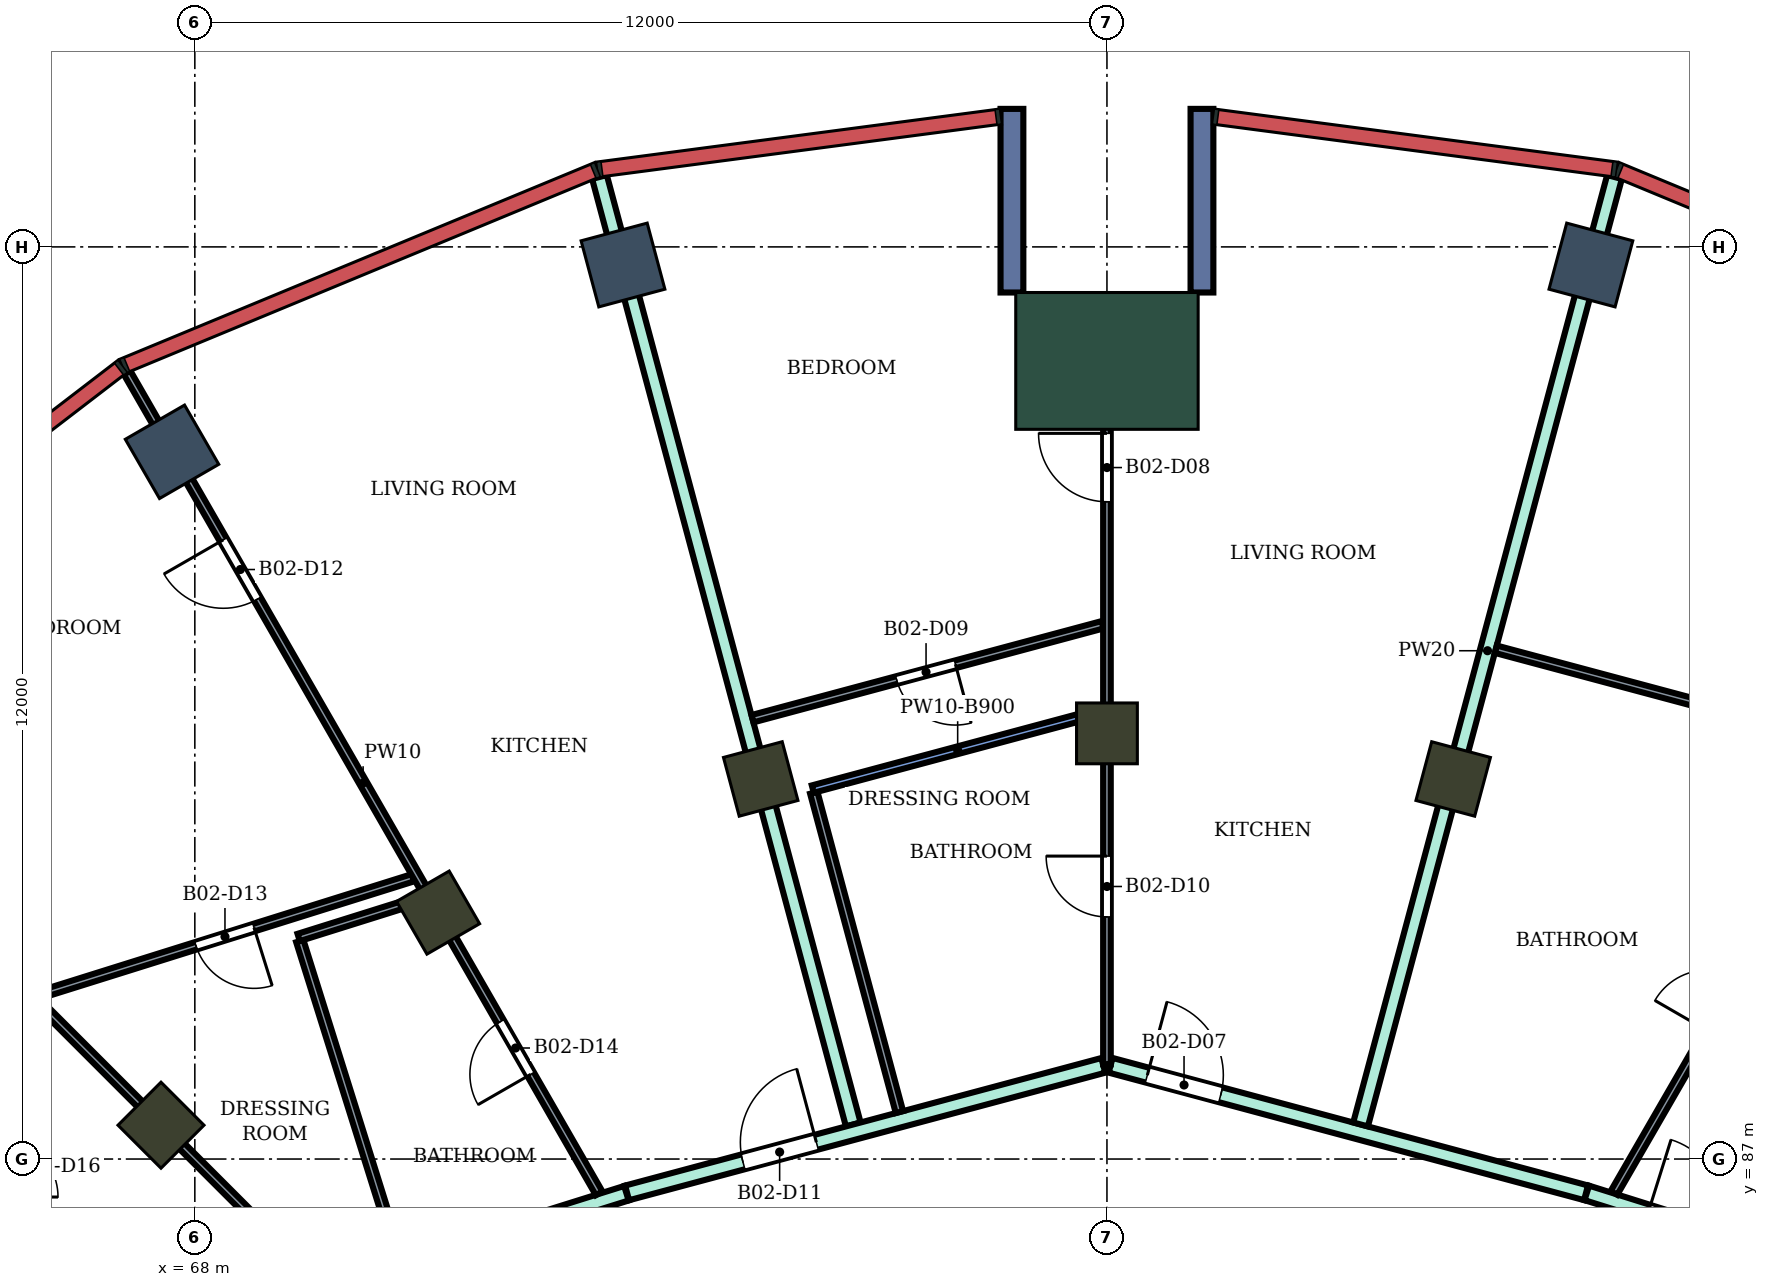
"""IFC4 building model, lengths in metres.
Left out: names, types, materials, properties, quantities, classifications, styles, units other than length and angle.
Written with IfcOpenShell. Run it as: python <this file> out.ifc"""

import sys

from ifc_helpers import new_model, si_unit, direction, frame, frame_2d, origin, origin_2d, place, context, subcontext, project, spatial, rectangle, extrude, element, fill, save


model = new_model("IFC4")
c1 = context("Model", 3, precision=1e-05, world=origin(), true_north=direction((0.0, 1.0)))
c2 = subcontext(c1, "Body", "Model", "MODEL_VIEW")
j1 = project(units=[si_unit("LENGTHUNIT", "METRE"), si_unit("PLANEANGLEUNIT", "RADIAN")], contexts=[c1])
p1 = place(None, origin())
s1 = spatial("IfcSite", under=j1, at=p1, CompositionType="ELEMENT")
p2 = place(p1, origin())
s2 = spatial("IfcBuilding", under=s1, at=p2, CompositionType="ELEMENT")
p3 = place(p2, frame((0.0, 0.0, 225.1)))
s3 = spatial("IfcBuildingStorey", under=s2, at=p3, CompositionType="ELEMENT", Elevation=225.1)
for number, where, z_axis, x_axis in (
    (1, (86.367, 98.762, 0.0), (0.0, 0.0, 1.0), (0.259, 0.966, 0.0)),
    (2, (73.633, 98.762, 0.0), (0.0, 0.0, 1.0), (-0.259, 0.966, 0.0)),
    (3, (67.7, 96.304, 0.0), (0.0, 0.0, 1.0), (-0.5, 0.866, 0.0)),
):
    element("IfcColumn", number, at=place(p3, frame(where, z_axis=z_axis, x_axis=x_axis)), inside=s3, PredefinedType="COLUMN", context=c2, shape_type="SweptSolid", body=[
        extrude(rectangle(XDim=0.9, YDim=0.9, at=origin_2d()), origin(), (0.0, 0.0, 1.0), 4.2),
    ])
for number, where, z_axis, x_axis in (
    (4, (84.555, 92.0, 0.0), (0.0, 0.0, 1.0), (0.259, 0.966, 0.0)),
    (5, (80.0, 92.6, 0.0), (0.0, 0.0, 1.0), (0.0, 1.0, 0.0)),
    (6, (75.445, 92.0, 0.0), (0.0, 0.0, 1.0), (-0.259, 0.966, 0.0)),
    (7, (71.2, 90.242, 0.0), (0.0, 0.0, 1.0), (-0.5, 0.866, 0.0)),
    (8, (67.555, 87.445, 0.0), (0.0, 0.0, 1.0), (-0.707, 0.707, 0.0)),
):
    element("IfcColumn", number, at=place(p3, frame(where, z_axis=z_axis, x_axis=x_axis)), inside=s3, PredefinedType="COLUMN", context=c2, shape_type="SweptSolid", body=[
        extrude(rectangle(XDim=0.8, YDim=0.8, at=origin_2d()), origin(), (0.0, 0.0, 1.0), 4.2),
    ])
p4 = place(p3, frame((80.0, 97.5, 0.0), z_axis=(0.0, 0.0, 1.0), x_axis=(0.0, 1.0, 0.0)))
e9 = element("IfcColumn", 9, at=p4, inside=s3, PredefinedType="COLUMN", context=c2, shape_type="SweptSolid", body=[
    extrude(rectangle(XDim=1.8, YDim=2.4, at=origin_2d()), origin(), (0.0, 0.0, 1.0), 4.2),
])
for number, where, z_axis, x_axis in (
    (10, (81.25, 98.4, 0.0), (0.0, 0.0, 1.0), (0.0, 1.0, 0.0)),
    (11, (78.75, 98.4, 0.0), (0.0, 0.0, 1.0), (0.0, 1.0, 0.0)),
):
    element("IfcWall", number, at=place(p3, frame(where, z_axis=z_axis, x_axis=x_axis)), inside=s3, PredefinedType="NOTDEFINED", context=c2, shape_type="SweptSolid", body=[
        extrude(rectangle(XDim=2.416, YDim=0.3, at=frame_2d((1.208, 0.0))), origin(), (0.0, 0.0, 1.0), 4.2),
    ])
p5 = place(p3, frame((68.2, 84.834, 0.0), z_axis=(0.0, 0.0, 1.0), x_axis=(0.954260265251, 0.298977166624, 0.0)))
e12 = element("IfcWall", 12, at=p5, inside=s3, PredefinedType="PARTITIONING", context=c2, shape_type="SweptSolid", body=[
    extrude(rectangle(XDim=5.741, YDim=0.2, at=frame_2d((2.87, 0.0))), origin(), (0.0, 0.0, 1.0), 3.75),
])
p6 = place(p3, frame((73.323, 99.919, 0.0), z_axis=(0.0, 0.0, 1.0), x_axis=(0.258768239436, -0.965939438194, 0.0)))
e13 = element("IfcWall", 13, at=p6, inside=s3, PredefinedType="PARTITIONING", context=c2, shape_type="SweptSolid", body=[
    extrude(rectangle(XDim=12.904, YDim=0.2, at=frame_2d((6.452, 0.0))), origin(), (0.0, 0.0, 1.0), 3.75),
])
p7 = place(p3, frame((73.687, 86.554, 0.0), z_axis=(0.0, 0.0, 1.0), x_axis=(0.96595258731, 0.258719150952, 0.0)))
e14 = element("IfcWall", 14, at=p7, inside=s3, PredefinedType="PARTITIONING", context=c2, shape_type="SweptSolid", body=[
    extrude(rectangle(XDim=6.486, YDim=0.2, at=frame_2d((3.243, 0.0))), origin(), (0.0, 0.0, 1.0), 3.75),
])
p8 = place(p7, frame((1.578, 0.0, 0.0)))
e15 = element("IfcOpeningElement", 15, at=p8, cuts=e14, PredefinedType="OPENING", context=c2, shape_type="SweptSolid", body=[
    extrude(rectangle(XDim=1.0, YDim=2.1, at=frame_2d((0.5, 1.05))), frame((0.0, 0.11, 0.0), z_axis=(0.0, -1.0, 0.0), x_axis=(1.0, 0.0, 0.0)), (0.0, 0.0, 1.0), 0.22),
])
p9 = place(p3, frame((80.048, 88.233, 0.0), z_axis=(0.0, 0.0, 1.0), x_axis=(0.965865387308, -0.259044501198, 0.0)))
e16 = element("IfcWall", 16, at=p9, inside=s3, PredefinedType="PARTITIONING", context=c2, shape_type="SweptSolid", body=[
    extrude(rectangle(XDim=6.476, YDim=0.2, at=frame_2d((3.238, 0.0))), origin(), (0.0, 0.0, 1.0), 3.75),
])
p10 = place(p9, frame((0.5, 0.0, 0.0)))
e17 = element("IfcOpeningElement", 17, at=p10, cuts=e16, PredefinedType="OPENING", context=c2, shape_type="SweptSolid", body=[
    extrude(rectangle(XDim=1.0, YDim=2.1, at=frame_2d((0.5, 1.05))), frame((0.0, 0.11, 0.0), z_axis=(0.0, -1.0, 0.0), x_axis=(1.0, 0.0, 0.0)), (0.0, 0.0, 1.0), 0.22),
])
p11 = place(p3, frame((83.337, 87.455, 0.0), z_axis=(0.0, 0.0, 1.0), x_axis=(0.258878883978, 0.965909790524, 0.0)))
e18 = element("IfcWall", 18, at=p11, inside=s3, PredefinedType="PARTITIONING", context=c2, shape_type="SweptSolid", body=[
    extrude(rectangle(XDim=12.904, YDim=0.2, at=frame_2d((6.452, 0.0))), origin(), (0.0, 0.0, 1.0), 3.75),
])
p12 = place(p3, frame((86.313, 86.554, 0.0), z_axis=(0.0, 0.0, 1.0), x_axis=(0.954081217458, -0.299548043717, 0.0)))
e19 = element("IfcWall", 19, at=p12, inside=s3, PredefinedType="PARTITIONING", context=c2, shape_type="SweptSolid", body=[
    extrude(rectangle(XDim=5.721, YDim=0.2, at=frame_2d((2.86, 0.0))), origin(), (0.0, 0.0, 1.0), 3.75),
])
p13 = place(p12, frame((0.848, 0.0, 0.0)))
e20 = element("IfcOpeningElement", 20, at=p13, cuts=e19, PredefinedType="OPENING", context=c2, shape_type="SweptSolid", body=[
    extrude(rectangle(XDim=1.0, YDim=2.1, at=frame_2d((0.5, 1.05))), frame((0.0, 0.11, 0.0), z_axis=(0.0, -1.0, 0.0), x_axis=(1.0, 0.0, 0.0)), (0.0, 0.0, 1.0), 0.22),
])
p14 = place(p3, frame((63.596, 91.406, 0.0), z_axis=(0.0, 0.0, 1.0), x_axis=(0.70700623685, -0.707207311228, 0.0)))
e21 = element("IfcWall", 21, at=p14, inside=s3, PredefinedType="PARTITIONING", context=c2, shape_type="SweptSolid", body=[
    extrude(rectangle(XDim=8.499, YDim=0.1, at=frame_2d((4.25, 0.0))), origin(), (0.0, 0.0, 1.0), 3.75),
])
p15 = place(p14, frame((1.632, 0.0, 0.0)))
e22 = element("IfcOpeningElement", 22, at=p15, cuts=e21, PredefinedType="OPENING", context=c2, shape_type="SweptSolid", body=[
    extrude(rectangle(XDim=0.9, YDim=2.1, at=frame_2d((0.45, 1.05))), frame((0.0, 0.06, 0.0), z_axis=(0.0, -1.0, 0.0), x_axis=(1.0, 0.0, 0.0)), (0.0, 0.0, 1.0), 0.12),
])
p16 = place(p3, frame((65.944, 89.157, 0.0), z_axis=(0.0, 0.0, 1.0), x_axis=(0.954235485309, 0.299056246512, 0.0)))
e23 = element("IfcWall", 23, at=p16, inside=s3, PredefinedType="PARTITIONING", context=c2, shape_type="SweptSolid", body=[
    extrude(rectangle(XDim=5.159, YDim=0.1, at=frame_2d((2.58, 0.0))), origin(), (0.0, 0.0, 1.0), 3.75),
])
p17 = place(p16, frame((2.17, 0.0, 0.0)))
e24 = element("IfcOpeningElement", 24, at=p17, cuts=e23, PredefinedType="OPENING", context=c2, shape_type="SweptSolid", body=[
    extrude(rectangle(XDim=0.8, YDim=2.1, at=frame_2d((0.4, 1.05))), frame((0.0, 0.06, 0.0), z_axis=(0.0, -1.0, 0.0), x_axis=(1.0, 0.0, 0.0)), (0.0, 0.0, 1.0), 0.12),
])
p18 = place(p3, frame((67.109, 97.346, 0.0), z_axis=(0.0, 0.0, 1.0), x_axis=(0.498583439824, -0.866841711925, 0.0)))
e25 = element("IfcWall", 25, at=p18, inside=s3, PredefinedType="PARTITIONING", context=c2, shape_type="SweptSolid", body=[
    extrude(rectangle(XDim=12.456, YDim=0.1, at=frame_2d((6.228, 0.0))), origin(), (0.0, 0.0, 1.0), 3.75),
])
p19 = place(p18, frame((2.538, 0.0, 0.0)))
e26 = element("IfcOpeningElement", 26, at=p19, cuts=e25, PredefinedType="OPENING", context=c2, shape_type="SweptSolid", body=[
    extrude(rectangle(XDim=0.9, YDim=2.1, at=frame_2d((0.45, 1.05))), frame((0.0, 0.06, 0.0), z_axis=(0.0, -1.0, 0.0), x_axis=(1.0, 0.0, 0.0)), (0.0, 0.0, 1.0), 0.12),
])
p20 = place(p18, frame((9.85, 0.0, 0.0)))
e27 = element("IfcOpeningElement", 27, at=p20, cuts=e25, PredefinedType="OPENING", context=c2, shape_type="SweptSolid", body=[
    extrude(rectangle(XDim=0.8, YDim=2.1, at=frame_2d((0.4, 1.05))), frame((0.0, 0.06, 0.0), z_axis=(0.0, -1.0, 0.0), x_axis=(1.0, 0.0, 0.0)), (0.0, 0.0, 1.0), 0.12),
])
p21 = place(p3, frame((69.381, 89.867, 0.0), z_axis=(0.0, 0.0, 1.0), x_axis=(0.29908659099, -0.954225974856, 0.0)))
e28 = element("IfcWall", 28, at=p21, inside=s3, PredefinedType="PARTITIONING", context=c2, shape_type="SweptSolid", body=[
    extrude(rectangle(XDim=4.35, YDim=0.1, at=frame_2d((2.175, 0.0))), origin(), (0.0, 0.0, 1.0), 3.75),
])
p22 = place(p3, frame((69.366, 89.915, 0.0), z_axis=(0.0, 0.0, 1.0), x_axis=(0.954163830168, 0.299284789457, 0.0)))
e29 = element("IfcWall", 29, at=p22, inside=s3, PredefinedType="PARTITIONING", context=c2, shape_type="SweptSolid", body=[
    extrude(rectangle(XDim=1.734, YDim=0.1, at=frame_2d((0.867, 0.0))), origin(), (0.0, 0.0, 1.0), 3.75),
])
p23 = place(p3, frame((75.337, 92.793, 0.0), z_axis=(0.0, 0.0, 1.0), x_axis=(0.965840336715, 0.259137886026, 0.0)))
e30 = element("IfcWall", 30, at=p23, inside=s3, PredefinedType="PARTITIONING", context=c2, shape_type="SweptSolid", body=[
    extrude(rectangle(XDim=4.768, YDim=0.1, at=frame_2d((2.384, 0.0))), origin(), (0.0, 0.0, 1.0), 3.75),
])
p24 = place(p23, frame((1.964, 0.0, 0.0)))
e31 = element("IfcOpeningElement", 31, at=p24, cuts=e30, PredefinedType="OPENING", context=c2, shape_type="SweptSolid", body=[
    extrude(rectangle(XDim=0.8, YDim=2.1, at=frame_2d((0.4, 1.05))), frame((0.0, 0.06, 0.0), z_axis=(0.0, -1.0, 0.0), x_axis=(1.0, 0.0, 0.0)), (0.0, 0.0, 1.0), 0.12),
])
p25 = place(p3, frame((76.143, 91.819, 0.0), z_axis=(0.0, 0.0, 1.0), x_axis=(0.259115794116, -0.965846263771, 0.0)))
e32 = element("IfcWall", 32, at=p25, inside=s3, PredefinedType="PARTITIONING", context=c2, shape_type="SweptSolid", body=[
    extrude(rectangle(XDim=4.349, YDim=0.1, at=frame_2d((2.175, 0.0))), origin(), (0.0, 0.0, 1.0), 3.75),
])
p26 = place(p3, frame((76.13, 91.867, 0.0), z_axis=(0.0, 0.0, 1.0), x_axis=(0.965860204905, 0.259063823373, 0.0)))
e33 = element("IfcWall", 33, at=p26, inside=s3, PredefinedType="PARTITIONING", context=c2, shape_type="SweptSolid", body=[
    extrude(rectangle(XDim=3.947, YDim=0.1, at=frame_2d((1.973, 0.0))), origin(), (0.0, 0.0, 1.0), 3.3),
])
p27 = place(p3, frame((80.0, 88.246, 0.0), z_axis=(0.0, 0.0, 1.0), x_axis=(0.0, 1.0, 0.0)))
e34 = element("IfcWall", 34, at=p27, inside=s3, PredefinedType="PARTITIONING", context=c2, shape_type="SweptSolid", body=[
    extrude(rectangle(XDim=9.954, YDim=0.1, at=frame_2d((4.977, 0.0))), origin(), (0.0, 0.0, 1.0), 3.75),
])
p28 = place(p27, frame((7.401, 0.0, 0.0)))
e35 = element("IfcOpeningElement", 35, at=p28, cuts=e34, PredefinedType="OPENING", context=c2, shape_type="SweptSolid", body=[
    extrude(rectangle(XDim=0.9, YDim=2.1, at=frame_2d((0.45, 1.05))), frame((0.0, 0.06, 0.0), z_axis=(0.0, -1.0, 0.0), x_axis=(1.0, 0.0, 0.0)), (0.0, 0.0, 1.0), 0.12),
])
p29 = place(p27, frame((1.939, 0.0, 0.0)))
e36 = element("IfcOpeningElement", 36, at=p29, cuts=e34, PredefinedType="OPENING", context=c2, shape_type="SweptSolid", body=[
    extrude(rectangle(XDim=0.8, YDim=2.1, at=frame_2d((0.4, 1.05))), frame((0.0, 0.06, 0.0), z_axis=(0.0, -1.0, 0.0), x_axis=(1.0, 0.0, 0.0)), (0.0, 0.0, 1.0), 0.12),
])
p30 = place(p3, frame((85.115, 93.707, 0.0), z_axis=(0.0, 0.0, 1.0), x_axis=(0.965985898153, -0.258594749694, 0.0)))
e37 = element("IfcWall", 37, at=p30, inside=s3, PredefinedType="PARTITIONING", context=c2, shape_type="SweptSolid", body=[
    extrude(rectangle(XDim=5.037, YDim=0.1, at=frame_2d((2.519, 0.0))), origin(), (0.0, 0.0, 1.0), 3.75),
])
p31 = place(p3, frame((86.671, 86.554, 0.0), z_axis=(0.0, 0.0, 1.0), x_axis=(0.500104188531, 0.865965242151, 0.0)))
e38 = element("IfcWall", 38, at=p31, inside=s3, PredefinedType="PARTITIONING", context=c2, shape_type="SweptSolid", body=[
    extrude(rectangle(XDim=12.456, YDim=0.1, at=frame_2d((6.228, 0.0))), origin(), (0.0, 0.0, 1.0), 3.75),
])
p32 = place(p31, frame((9.111, 0.0, 0.0)))
e39 = element("IfcOpeningElement", 39, at=p32, cuts=e38, PredefinedType="OPENING", context=c2, shape_type="SweptSolid", body=[
    extrude(rectangle(XDim=0.9, YDim=2.1, at=frame_2d((0.45, 1.05))), frame((0.0, 0.06, 0.0), z_axis=(0.0, -1.0, 0.0), x_axis=(1.0, 0.0, 0.0)), (0.0, 0.0, 1.0), 0.12),
])
p33 = place(p31, frame((2.462, 0.0, 0.0)))
e40 = element("IfcOpeningElement", 40, at=p33, cuts=e38, PredefinedType="OPENING", context=c2, shape_type="SweptSolid", body=[
    extrude(rectangle(XDim=0.8, YDim=2.1, at=frame_2d((0.4, 1.05))), frame((0.0, 0.06, 0.0), z_axis=(0.0, -1.0, 0.0), x_axis=(1.0, 0.0, 0.0)), (0.0, 0.0, 1.0), 0.12),
])
p34 = place(p10, origin())
e41 = element("IfcDoor", 41, at=p34, inside=s3, OperationType="SINGLE_SWING_LEFT", PredefinedType="DOOR", context=c2, shape_type="SweptSolid", body=[
    extrude(rectangle(XDim=1.0, YDim=2.1, at=frame_2d((0.5, 1.05))), frame((0.0, 0.025, 0.0), z_axis=(0.0, -1.0, 0.0), x_axis=(1.0, 0.0, 0.0)), (0.0, 0.0, 1.0), 0.05),
])
fill(e17, e41)
p35 = place(p28, origin())
e42 = element("IfcDoor", 42, at=p35, inside=s3, OperationType="SINGLE_SWING_RIGHT", PredefinedType="DOOR", context=c2, shape_type="SweptSolid", body=[
    extrude(rectangle(XDim=0.9, YDim=2.1, at=frame_2d((0.45, 1.05))), frame((0.0, 0.025, 0.0), z_axis=(0.0, -1.0, 0.0), x_axis=(1.0, 0.0, 0.0)), (0.0, 0.0, 1.0), 0.05),
])
fill(e35, e42)
p36 = place(p24, frame((0.8, 0.0, 0.0), z_axis=(0.0, 0.0, 1.0), x_axis=(-1.0, 0.0, 0.0)))
e43 = element("IfcDoor", 43, at=p36, inside=s3, OperationType="SINGLE_SWING_LEFT", PredefinedType="DOOR", context=c2, shape_type="SweptSolid", body=[
    extrude(rectangle(XDim=0.8, YDim=2.1, at=frame_2d((0.4, 1.05))), frame((0.0, 0.025, 0.0), z_axis=(0.0, -1.0, 0.0), x_axis=(1.0, 0.0, 0.0)), (0.0, 0.0, 1.0), 0.05),
])
fill(e31, e43)
p37 = place(p29, origin())
e44 = element("IfcDoor", 44, at=p37, inside=s3, OperationType="SINGLE_SWING_RIGHT", PredefinedType="DOOR", context=c2, shape_type="SweptSolid", body=[
    extrude(rectangle(XDim=0.8, YDim=2.1, at=frame_2d((0.4, 1.05))), frame((0.0, 0.025, 0.0), z_axis=(0.0, -1.0, 0.0), x_axis=(1.0, 0.0, 0.0)), (0.0, 0.0, 1.0), 0.05),
])
fill(e36, e44)
p38 = place(p8, origin())
e45 = element("IfcDoor", 45, at=p38, inside=s3, OperationType="SINGLE_SWING_RIGHT", PredefinedType="DOOR", context=c2, shape_type="SweptSolid", body=[
    extrude(rectangle(XDim=1.0, YDim=2.1, at=frame_2d((0.5, 1.05))), frame((0.0, 0.025, 0.0), z_axis=(0.0, -1.0, 0.0), x_axis=(1.0, 0.0, 0.0)), (0.0, 0.0, 1.0), 0.05),
])
fill(e15, e45)
p39 = place(p19, frame((0.9, 0.0, 0.0), z_axis=(0.0, 0.0, 1.0), x_axis=(-1.0, 0.0, 0.0)))
e46 = element("IfcDoor", 46, at=p39, inside=s3, OperationType="SINGLE_SWING_RIGHT", PredefinedType="DOOR", context=c2, shape_type="SweptSolid", body=[
    extrude(rectangle(XDim=0.9, YDim=2.1, at=frame_2d((0.45, 1.05))), frame((0.0, 0.025, 0.0), z_axis=(0.0, -1.0, 0.0), x_axis=(1.0, 0.0, 0.0)), (0.0, 0.0, 1.0), 0.05),
])
fill(e26, e46)
p40 = place(p17, frame((0.8, 0.0, 0.0), z_axis=(0.0, 0.0, 1.0), x_axis=(-1.0, 0.0, 0.0)))
e47 = element("IfcDoor", 47, at=p40, inside=s3, OperationType="SINGLE_SWING_LEFT", PredefinedType="DOOR", context=c2, shape_type="SweptSolid", body=[
    extrude(rectangle(XDim=0.8, YDim=2.1, at=frame_2d((0.4, 1.05))), frame((0.0, 0.025, 0.0), z_axis=(0.0, -1.0, 0.0), x_axis=(1.0, 0.0, 0.0)), (0.0, 0.0, 1.0), 0.05),
])
fill(e24, e47)
p41 = place(p20, frame((0.8, 0.0, 0.0), z_axis=(0.0, 0.0, 1.0), x_axis=(-1.0, 0.0, 0.0)))
e48 = element("IfcDoor", 48, at=p41, inside=s3, OperationType="SINGLE_SWING_LEFT", PredefinedType="DOOR", context=c2, shape_type="SweptSolid", body=[
    extrude(rectangle(XDim=0.8, YDim=2.1, at=frame_2d((0.4, 1.05))), frame((0.0, 0.025, 0.0), z_axis=(0.0, -1.0, 0.0), x_axis=(1.0, 0.0, 0.0)), (0.0, 0.0, 1.0), 0.05),
])
fill(e27, e48)
save(model, sys.argv[1])
